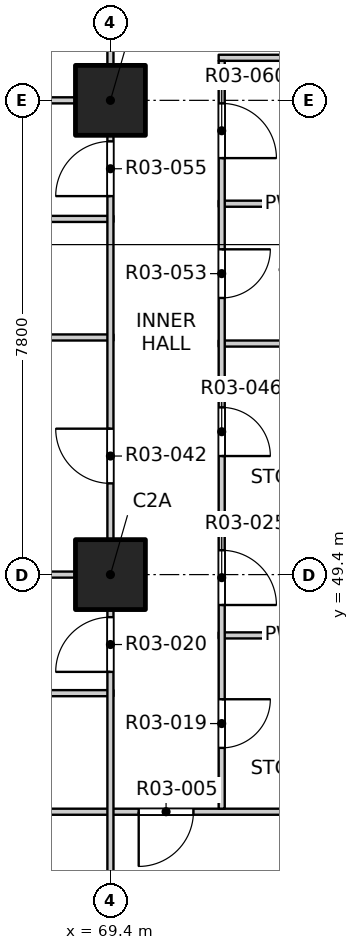
"""IFC4 building model, lengths in metres.
Left out: names, types, materials, properties, quantities, classifications, styles, units other than length and angle.
Written with IfcOpenShell. Run it as: python <this file> out.ifc"""

import sys

from ifc_helpers import new_model, si_unit, direction, frame, frame_2d, origin, origin_2d, place, context, subcontext, project, spatial, rectangle, extrude, element, fill, save


model = new_model("IFC4")
c1 = context("Model", 3, precision=1e-05, world=origin(), true_north=direction((0.0, 1.0)))
c2 = subcontext(c1, "Body", "Model", "MODEL_VIEW")
j1 = project(units=[si_unit("LENGTHUNIT", "METRE"), si_unit("PLANEANGLEUNIT", "RADIAN")], contexts=[c1])
p1 = place(None, origin())
s1 = spatial("IfcSite", under=j1, at=p1, CompositionType="ELEMENT")
p2 = place(p1, origin())
s2 = spatial("IfcBuilding", under=s1, at=p2, CompositionType="ELEMENT")
p3 = place(p2, frame((0.0, 0.0, 39.9)))
s3 = spatial("IfcBuildingStorey", under=s2, at=p3, CompositionType="ELEMENT", Elevation=39.9)
for number, where, z_axis, x_axis in (
    (1, (69.4, 49.4, -0.25), (0.0, 0.0, 1.0), (1.0, 0.0, 0.0)),
    (2, (69.4, 57.2, -0.25), (0.0, 0.0, 1.0), (1.0, 0.0, 0.0)),
):
    element("IfcColumn", number, at=place(p3, frame(where, z_axis=z_axis, x_axis=x_axis)), inside=s3, PredefinedType="COLUMN", context=c2, shape_type="SweptSolid", body=[
        extrude(rectangle(XDim=1.15, YDim=1.15, at=origin_2d()), origin(), (0.0, 0.0, 1.0), 3.4),
    ])
p4 = place(p3, frame((61.9, 45.5, 0.0), z_axis=(0.0, 0.0, 1.0), x_axis=(1.0, 0.0, 0.0)))
e3 = element("IfcWall", 3, at=p4, inside=s3, PredefinedType="PARTITIONING", context=c2, shape_type="SweptSolid", body=[
    extrude(rectangle(XDim=11.5, YDim=0.1, at=frame_2d((5.75, 0.0))), origin(), (0.0, 0.0, 1.0), 3.15),
])
p5 = place(p4, frame((7.965, 0.0, 0.0)))
e4 = element("IfcOpeningElement", 4, at=p5, cuts=e3, PredefinedType="OPENING", context=c2, shape_type="SweptSolid", body=[
    extrude(rectangle(XDim=0.9, YDim=2.1, at=frame_2d((0.45, 1.05))), frame((0.0, 0.06, 0.0), z_axis=(0.0, -1.0, 0.0), x_axis=(1.0, 0.0, 0.0)), (0.0, 0.0, 1.0), 0.12),
])
p6 = place(p3, frame((65.75, 47.45, 0.0), z_axis=(0.0, 0.0, 1.0), x_axis=(1.0, 0.0, 0.0)))
e5 = element("IfcWall", 5, at=p6, inside=s3, PredefinedType="PARTITIONING", context=c2, shape_type="SweptSolid", body=[
    extrude(rectangle(XDim=3.7, YDim=0.1, at=frame_2d((1.85, 0.0))), origin(), (0.0, 0.0, 1.0), 3.15),
])
p7 = place(p3, frame((71.18, 48.4, 0.0), z_axis=(0.0, 0.0, 1.0), x_axis=(1.0, 0.0, 0.0)))
e6 = element("IfcWall", 6, at=p7, inside=s3, PredefinedType="PARTITIONING", context=c2, shape_type="SweptSolid", body=[
    extrude(rectangle(XDim=2.22, YDim=0.1, at=frame_2d((1.11, 0.0))), origin(), (0.0, 0.0, 1.0), 3.15),
])
p8 = place(p3, frame((61.9, 49.4, 0.0), z_axis=(0.0, 0.0, 1.0), x_axis=(1.0, 0.0, 0.0)))
e7 = element("IfcWall", 7, at=p8, inside=s3, PredefinedType="PARTITIONING", context=c2, shape_type="SweptSolid", body=[
    extrude(rectangle(XDim=7.55, YDim=0.1, at=frame_2d((3.775, 0.0))), origin(), (0.0, 0.0, 1.0), 3.15),
])
p9 = place(p3, frame((71.18, 50.3, 0.0), z_axis=(0.0, 0.0, 1.0), x_axis=(1.0, 0.0, 0.0)))
e8 = element("IfcWall", 8, at=p9, inside=s3, PredefinedType="PARTITIONING", context=c2, shape_type="SweptSolid", body=[
    extrude(rectangle(XDim=2.22, YDim=0.1, at=frame_2d((1.11, 0.0))), origin(), (0.0, 0.0, 1.0), 3.15),
])
p10 = place(p3, frame((71.18, 53.2, 0.0), z_axis=(0.0, 0.0, 1.0), x_axis=(1.0, 0.0, 0.0)))
e9 = element("IfcWall", 9, at=p10, inside=s3, PredefinedType="PARTITIONING", context=c2, shape_type="SweptSolid", body=[
    extrude(rectangle(XDim=2.02, YDim=0.1, at=frame_2d((1.01, 0.0))), origin(), (0.0, 0.0, 1.0), 3.15),
])
p11 = place(p3, frame((61.9, 53.3, 0.0), z_axis=(0.0, 0.0, 1.0), x_axis=(1.0, 0.0, 0.0)))
e10 = element("IfcWall", 10, at=p11, inside=s3, PredefinedType="PARTITIONING", context=c2, shape_type="SweptSolid", body=[
    extrude(rectangle(XDim=7.55, YDim=0.1, at=frame_2d((3.775, 0.0))), origin(), (0.0, 0.0, 1.0), 3.15),
])
p12 = place(p3, frame((65.75, 55.25, 0.0), z_axis=(0.0, 0.0, 1.0), x_axis=(1.0, 0.0, 0.0)))
e11 = element("IfcWall", 11, at=p12, inside=s3, PredefinedType="PARTITIONING", context=c2, shape_type="SweptSolid", body=[
    extrude(rectangle(XDim=3.7, YDim=0.1, at=frame_2d((1.85, 0.0))), origin(), (0.0, 0.0, 1.0), 3.15),
])
p13 = place(p3, frame((71.18, 55.5, 0.0), z_axis=(0.0, 0.0, 1.0), x_axis=(1.0, 0.0, 0.0)))
e12 = element("IfcWall", 12, at=p13, inside=s3, PredefinedType="PARTITIONING", context=c2, shape_type="SweptSolid", body=[
    extrude(rectangle(XDim=2.22, YDim=0.1, at=frame_2d((1.11, 0.0))), origin(), (0.0, 0.0, 1.0), 3.15),
])
p14 = place(p3, frame((61.9, 57.2, 0.0), z_axis=(0.0, 0.0, 1.0), x_axis=(1.0, 0.0, 0.0)))
e13 = element("IfcWall", 13, at=p14, inside=s3, PredefinedType="PARTITIONING", context=c2, shape_type="SweptSolid", body=[
    extrude(rectangle(XDim=7.55, YDim=0.1, at=frame_2d((3.775, 0.0))), origin(), (0.0, 0.0, 1.0), 2.55),
])
p15 = place(p3, frame((71.18, 57.9, 0.0), z_axis=(0.0, 0.0, 1.0), x_axis=(1.0, 0.0, 0.0)))
e14 = element("IfcWall", 14, at=p15, inside=s3, PredefinedType="PARTITIONING", context=c2, shape_type="SweptSolid", body=[
    extrude(rectangle(XDim=2.22, YDim=0.1, at=frame_2d((1.11, 0.0))), origin(), (0.0, 0.0, 1.0), 3.15),
])
p16 = place(p3, frame((69.4, 41.9, 0.0), z_axis=(0.0, 0.0, 1.0), x_axis=(0.0, 1.0, 0.0)))
e15 = element("IfcWall", 15, at=p16, inside=s3, PredefinedType="PARTITIONING", context=c2, shape_type="SweptSolid", body=[
    extrude(rectangle(XDim=46.2, YDim=0.1, at=frame_2d((23.1, 0.0))), origin(), (0.0, 0.0, 1.0), 3.15),
])
p17 = place(p16, frame((1.2, 0.0, 0.0)))
e16 = element("IfcOpeningElement", 16, at=p17, cuts=e15, PredefinedType="OPENING", context=c2, shape_type="SweptSolid", body=[
    extrude(rectangle(XDim=0.9, YDim=2.1, at=frame_2d((0.45, 1.05))), frame((0.0, 0.06, 0.0), z_axis=(0.0, -1.0, 0.0), x_axis=(1.0, 0.0, 0.0)), (0.0, 0.0, 1.0), 0.12),
])
p18 = place(p16, frame((5.9, 0.0, 0.0)))
e17 = element("IfcOpeningElement", 17, at=p18, cuts=e15, PredefinedType="OPENING", context=c2, shape_type="SweptSolid", body=[
    extrude(rectangle(XDim=0.9, YDim=2.1, at=frame_2d((0.45, 1.05))), frame((0.0, 0.06, 0.0), z_axis=(0.0, -1.0, 0.0), x_axis=(1.0, 0.0, 0.0)), (0.0, 0.0, 1.0), 0.12),
])
p19 = place(p16, frame((9.0, 0.0, 0.0)))
e18 = element("IfcOpeningElement", 18, at=p19, cuts=e15, PredefinedType="OPENING", context=c2, shape_type="SweptSolid", body=[
    extrude(rectangle(XDim=0.9, YDim=2.1, at=frame_2d((0.45, 1.05))), frame((0.0, 0.06, 0.0), z_axis=(0.0, -1.0, 0.0), x_axis=(1.0, 0.0, 0.0)), (0.0, 0.0, 1.0), 0.12),
])
p20 = place(p16, frame((13.725, 0.0, 0.0)))
e19 = element("IfcOpeningElement", 19, at=p20, cuts=e15, PredefinedType="OPENING", context=c2, shape_type="SweptSolid", body=[
    extrude(rectangle(XDim=0.9, YDim=2.1, at=frame_2d((0.45, 1.05))), frame((0.0, 0.06, 0.0), z_axis=(0.0, -1.0, 0.0), x_axis=(1.0, 0.0, 0.0)), (0.0, 0.0, 1.0), 0.12),
])
p21 = place(p16, frame((17.775, 0.0, 0.0)))
e20 = element("IfcOpeningElement", 20, at=p21, cuts=e15, PredefinedType="OPENING", context=c2, shape_type="SweptSolid", body=[
    extrude(rectangle(XDim=0.9, YDim=2.1, at=frame_2d((0.45, 1.05))), frame((0.0, 0.06, 0.0), z_axis=(0.0, -1.0, 0.0), x_axis=(1.0, 0.0, 0.0)), (0.0, 0.0, 1.0), 0.12),
])
p22 = place(p16, frame((20.7, 0.0, 0.0)))
e21 = element("IfcOpeningElement", 21, at=p22, cuts=e15, PredefinedType="OPENING", context=c2, shape_type="SweptSolid", body=[
    extrude(rectangle(XDim=0.9, YDim=2.1, at=frame_2d((0.45, 1.05))), frame((0.0, 0.06, 0.0), z_axis=(0.0, -1.0, 0.0), x_axis=(1.0, 0.0, 0.0)), (0.0, 0.0, 1.0), 0.12),
])
p23 = place(p16, frame((25.575, 0.0, 0.0)))
e22 = element("IfcOpeningElement", 22, at=p23, cuts=e15, PredefinedType="OPENING", context=c2, shape_type="SweptSolid", body=[
    extrude(rectangle(XDim=0.9, YDim=2.1, at=frame_2d((0.45, 1.05))), frame((0.0, 0.06, 0.0), z_axis=(0.0, -1.0, 0.0), x_axis=(1.0, 0.0, 0.0)), (0.0, 0.0, 1.0), 0.12),
])
p24 = place(p16, frame((28.5, 0.0, 0.0)))
e23 = element("IfcOpeningElement", 23, at=p24, cuts=e15, PredefinedType="OPENING", context=c2, shape_type="SweptSolid", body=[
    extrude(rectangle(XDim=0.9, YDim=2.1, at=frame_2d((0.45, 1.05))), frame((0.0, 0.06, 0.0), z_axis=(0.0, -1.0, 0.0), x_axis=(1.0, 0.0, 0.0)), (0.0, 0.0, 1.0), 0.12),
])
p25 = place(p16, frame((33.375, 0.0, 0.0)))
e24 = element("IfcOpeningElement", 24, at=p25, cuts=e15, PredefinedType="OPENING", context=c2, shape_type="SweptSolid", body=[
    extrude(rectangle(XDim=0.9, YDim=2.1, at=frame_2d((0.45, 1.05))), frame((0.0, 0.06, 0.0), z_axis=(0.0, -1.0, 0.0), x_axis=(1.0, 0.0, 0.0)), (0.0, 0.0, 1.0), 0.12),
])
p26 = place(p16, frame((36.3, 0.0, 0.0)))
e25 = element("IfcOpeningElement", 25, at=p26, cuts=e15, PredefinedType="OPENING", context=c2, shape_type="SweptSolid", body=[
    extrude(rectangle(XDim=0.9, YDim=2.1, at=frame_2d((0.45, 1.05))), frame((0.0, 0.06, 0.0), z_axis=(0.0, -1.0, 0.0), x_axis=(1.0, 0.0, 0.0)), (0.0, 0.0, 1.0), 0.12),
])
p27 = place(p16, frame((40.2, 0.0, 0.0)))
e26 = element("IfcOpeningElement", 26, at=p27, cuts=e15, PredefinedType="OPENING", context=c2, shape_type="SweptSolid", body=[
    extrude(rectangle(XDim=0.9, YDim=2.1, at=frame_2d((0.45, 1.05))), frame((0.0, 0.06, 0.0), z_axis=(0.0, -1.0, 0.0), x_axis=(1.0, 0.0, 0.0)), (0.0, 0.0, 1.0), 0.12),
])
p28 = place(p16, frame((44.1, 0.0, 0.0)))
e27 = element("IfcOpeningElement", 27, at=p28, cuts=e15, PredefinedType="OPENING", context=c2, shape_type="SweptSolid", body=[
    extrude(rectangle(XDim=0.9, YDim=2.1, at=frame_2d((0.45, 1.05))), frame((0.0, 0.06, 0.0), z_axis=(0.0, -1.0, 0.0), x_axis=(1.0, 0.0, 0.0)), (0.0, 0.0, 1.0), 0.12),
])
p29 = place(p3, frame((71.23, 45.55, 0.0), z_axis=(0.0, 0.0, 1.0), x_axis=(0.0, 1.0, 0.0)))
e28 = element("IfcWall", 28, at=p29, inside=s3, PredefinedType="PARTITIONING", context=c2, shape_type="SweptSolid", body=[
    extrude(rectangle(XDim=12.3, YDim=0.1, at=frame_2d((6.15, 0.0))), origin(), (0.0, 0.0, 1.0), 3.15),
])
p30 = place(p29, frame((1.0, 0.0, 0.0)))
e29 = element("IfcOpeningElement", 29, at=p30, cuts=e28, PredefinedType="OPENING", context=c2, shape_type="SweptSolid", body=[
    extrude(rectangle(XDim=0.8, YDim=2.1, at=frame_2d((0.4, 1.05))), frame((0.0, 0.06, 0.0), z_axis=(0.0, -1.0, 0.0), x_axis=(1.0, 0.0, 0.0)), (0.0, 0.0, 1.0), 0.12),
])
p31 = place(p29, frame((3.35, 0.0, 0.0)))
e30 = element("IfcOpeningElement", 30, at=p31, cuts=e28, PredefinedType="OPENING", context=c2, shape_type="SweptSolid", body=[
    extrude(rectangle(XDim=0.9, YDim=2.1, at=frame_2d((0.45, 1.05))), frame((0.0, 0.06, 0.0), z_axis=(0.0, -1.0, 0.0), x_axis=(1.0, 0.0, 0.0)), (0.0, 0.0, 1.0), 0.12),
])
p32 = place(p29, frame((5.8, 0.0, 0.0)))
e31 = element("IfcOpeningElement", 31, at=p32, cuts=e28, PredefinedType="OPENING", context=c2, shape_type="SweptSolid", body=[
    extrude(rectangle(XDim=0.8, YDim=2.1, at=frame_2d((0.4, 1.05))), frame((0.0, 0.06, 0.0), z_axis=(0.0, -1.0, 0.0), x_axis=(1.0, 0.0, 0.0)), (0.0, 0.0, 1.0), 0.12),
])
p33 = place(p29, frame((8.4, 0.0, 0.0)))
e32 = element("IfcOpeningElement", 32, at=p33, cuts=e28, PredefinedType="OPENING", context=c2, shape_type="SweptSolid", body=[
    extrude(rectangle(XDim=0.8, YDim=2.1, at=frame_2d((0.4, 1.05))), frame((0.0, 0.06, 0.0), z_axis=(0.0, -1.0, 0.0), x_axis=(1.0, 0.0, 0.0)), (0.0, 0.0, 1.0), 0.12),
])
p34 = place(p29, frame((10.7, 0.0, 0.0)))
e33 = element("IfcOpeningElement", 33, at=p34, cuts=e28, PredefinedType="OPENING", context=c2, shape_type="SweptSolid", body=[
    extrude(rectangle(XDim=0.9, YDim=2.1, at=frame_2d((0.45, 1.05))), frame((0.0, 0.06, 0.0), z_axis=(0.0, -1.0, 0.0), x_axis=(1.0, 0.0, 0.0)), (0.0, 0.0, 1.0), 0.12),
])
p35 = place(p5, origin())
e34 = element("IfcDoor", 34, at=p35, inside=s3, OperationType="SINGLE_SWING_RIGHT", PredefinedType="DOOR", context=c2, shape_type="SweptSolid", body=[
    extrude(rectangle(XDim=0.9, YDim=2.1, at=frame_2d((0.45, 1.05))), frame((0.0, 0.025, 0.0), z_axis=(0.0, -1.0, 0.0), x_axis=(1.0, 0.0, 0.0)), (0.0, 0.0, 1.0), 0.05),
])
fill(e4, e34)
p36 = place(p30, origin())
e35 = element("IfcDoor", 35, at=p36, inside=s3, OperationType="SINGLE_SWING_LEFT", PredefinedType="DOOR", context=c2, shape_type="SweptSolid", body=[
    extrude(rectangle(XDim=0.8, YDim=2.1, at=frame_2d((0.4, 1.05))), frame((0.0, 0.025, 0.0), z_axis=(0.0, -1.0, 0.0), x_axis=(1.0, 0.0, 0.0)), (0.0, 0.0, 1.0), 0.05),
])
fill(e29, e35)
p37 = place(p18, origin())
e36 = element("IfcDoor", 36, at=p37, inside=s3, OperationType="SINGLE_SWING_LEFT", PredefinedType="DOOR", context=c2, shape_type="SweptSolid", body=[
    extrude(rectangle(XDim=0.9, YDim=2.1, at=frame_2d((0.45, 1.05))), frame((0.0, 0.025, 0.0), z_axis=(0.0, -1.0, 0.0), x_axis=(1.0, 0.0, 0.0)), (0.0, 0.0, 1.0), 0.05),
])
fill(e17, e36)
p38 = place(p31, origin())
e37 = element("IfcDoor", 37, at=p38, inside=s3, OperationType="SINGLE_SWING_RIGHT", PredefinedType="DOOR", context=c2, shape_type="SweptSolid", body=[
    extrude(rectangle(XDim=0.9, YDim=2.1, at=frame_2d((0.45, 1.05))), frame((0.0, 0.025, 0.0), z_axis=(0.0, -1.0, 0.0), x_axis=(1.0, 0.0, 0.0)), (0.0, 0.0, 1.0), 0.05),
])
fill(e30, e37)
p39 = place(p19, origin())
e38 = element("IfcDoor", 38, at=p39, inside=s3, OperationType="SINGLE_SWING_RIGHT", PredefinedType="DOOR", context=c2, shape_type="SweptSolid", body=[
    extrude(rectangle(XDim=0.9, YDim=2.1, at=frame_2d((0.45, 1.05))), frame((0.0, 0.025, 0.0), z_axis=(0.0, -1.0, 0.0), x_axis=(1.0, 0.0, 0.0)), (0.0, 0.0, 1.0), 0.05),
])
fill(e18, e38)
p40 = place(p32, origin())
e39 = element("IfcDoor", 39, at=p40, inside=s3, OperationType="SINGLE_SWING_RIGHT", PredefinedType="DOOR", context=c2, shape_type="SweptSolid", body=[
    extrude(rectangle(XDim=0.8, YDim=2.1, at=frame_2d((0.4, 1.05))), frame((0.0, 0.025, 0.0), z_axis=(0.0, -1.0, 0.0), x_axis=(1.0, 0.0, 0.0)), (0.0, 0.0, 1.0), 0.05),
])
fill(e31, e39)
p41 = place(p33, origin())
e40 = element("IfcDoor", 40, at=p41, inside=s3, OperationType="SINGLE_SWING_LEFT", PredefinedType="DOOR", context=c2, shape_type="SweptSolid", body=[
    extrude(rectangle(XDim=0.8, YDim=2.1, at=frame_2d((0.4, 1.05))), frame((0.0, 0.025, 0.0), z_axis=(0.0, -1.0, 0.0), x_axis=(1.0, 0.0, 0.0)), (0.0, 0.0, 1.0), 0.05),
])
fill(e32, e40)
p42 = place(p20, origin())
e41 = element("IfcDoor", 41, at=p42, inside=s3, OperationType="SINGLE_SWING_LEFT", PredefinedType="DOOR", context=c2, shape_type="SweptSolid", body=[
    extrude(rectangle(XDim=0.9, YDim=2.1, at=frame_2d((0.45, 1.05))), frame((0.0, 0.025, 0.0), z_axis=(0.0, -1.0, 0.0), x_axis=(1.0, 0.0, 0.0)), (0.0, 0.0, 1.0), 0.05),
])
fill(e19, e41)
p43 = place(p34, origin())
e42 = element("IfcDoor", 42, at=p43, inside=s3, OperationType="SINGLE_SWING_RIGHT", PredefinedType="DOOR", context=c2, shape_type="SweptSolid", body=[
    extrude(rectangle(XDim=0.9, YDim=2.1, at=frame_2d((0.45, 1.05))), frame((0.0, 0.025, 0.0), z_axis=(0.0, -1.0, 0.0), x_axis=(1.0, 0.0, 0.0)), (0.0, 0.0, 1.0), 0.05),
])
fill(e33, e42)
save(model, sys.argv[1])
